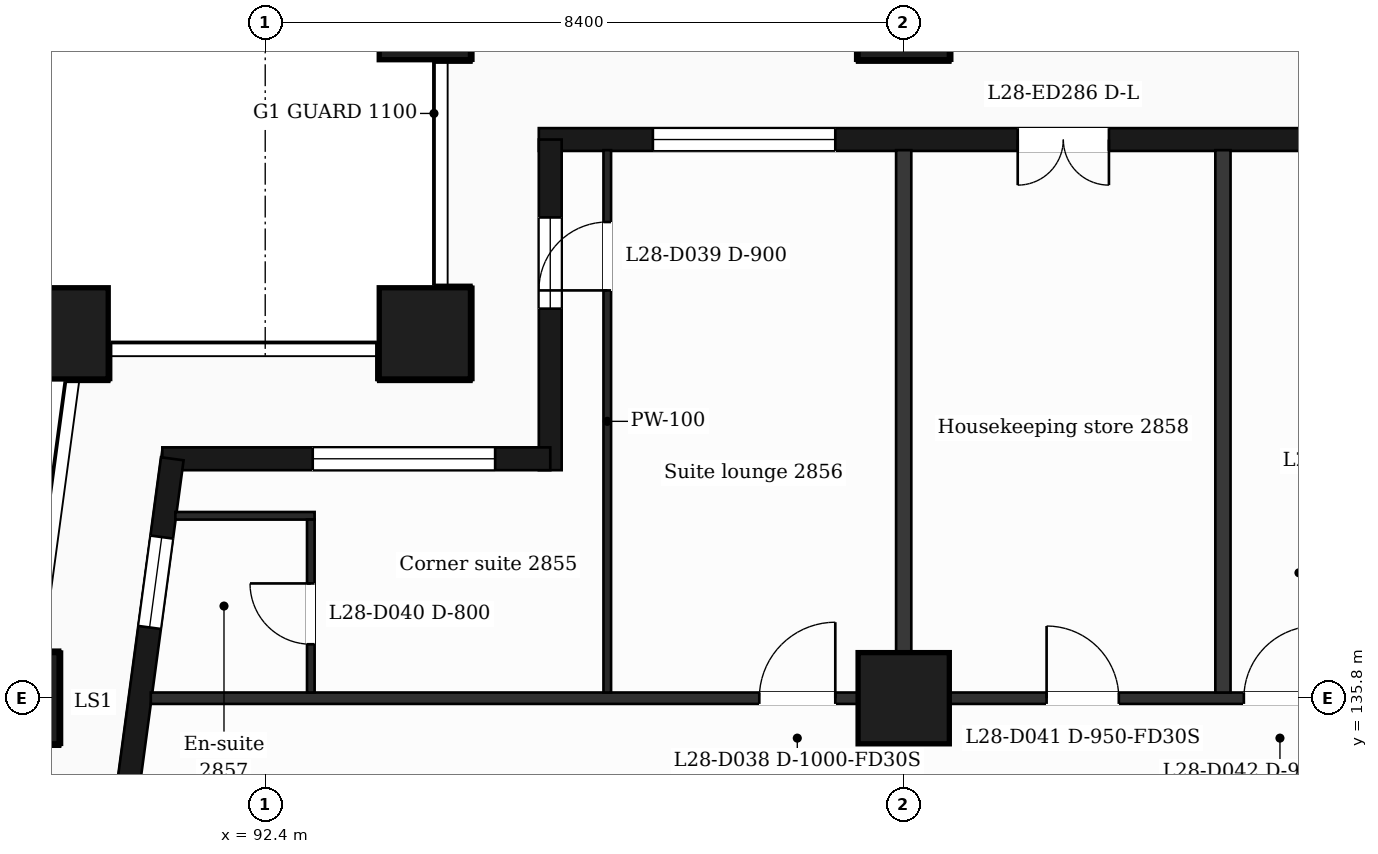
"""IFC4 building model, lengths in metres.
Left out: names, types, materials, properties, quantities, classifications, styles, units other than length and angle.
Written with IfcOpenShell. Run it as: python <this file> out.ifc"""

import sys

from ifc_helpers import new_model, si_unit, direction, frame, frame_2d, origin, origin_2d, place, context, subcontext, project, spatial, rectangle, extrude, element, fill, save


model = new_model("IFC4")
c1 = context("Model", 3, precision=1e-05, world=origin(), true_north=direction((0.0, 1.0)))
c2 = subcontext(c1, "Body", "Model", "MODEL_VIEW")
j1 = project(units=[si_unit("LENGTHUNIT", "METRE"), si_unit("PLANEANGLEUNIT", "RADIAN")], contexts=[c1])
p1 = place(None, origin())
s1 = spatial("IfcSite", under=j1, at=p1, CompositionType="ELEMENT")
p2 = place(p1, origin())
s2 = spatial("IfcBuilding", under=s1, at=p2, CompositionType="ELEMENT")
p3 = place(p2, frame((0.0, 0.0, 120.6)))
s3 = spatial("IfcBuildingStorey", under=s2, at=p3, CompositionType="ELEMENT", Elevation=120.6)
for number, where, z_axis, x_axis in (
    (1, (94.5, 140.6, 0.0), (0.0, 0.0, 1.0), (1.0, 0.0, 0.0)),
    (2, (89.735, 140.6, 0.0), (0.0, 0.0, 1.0), (1.0, 0.0, 0.0)),
    (3, (100.8, 135.8, 0.0), (0.0, 0.0, 1.0), (1.0, 0.0, 0.0)),
    (4, (89.088, 135.8, 0.0), (0.0, 0.0, 1.0), (1.0, 0.0, 0.0)),
    (5, (100.8, 144.8, 0.0), (0.0, 0.0, 1.0), (1.0, 0.0, 0.0)),
    (6, (94.5, 144.8, 0.0), (0.0, 0.0, 1.0), (1.0, 0.0, 0.0)),
):
    element("IfcColumn", number, at=place(p3, frame(where, z_axis=z_axis, x_axis=x_axis)), inside=s3, PredefinedType="COLUMN", context=c2, shape_type="SweptSolid", body=[
        extrude(rectangle(XDim=1.2, YDim=1.2, at=origin_2d()), origin(), (0.0, 0.0, 1.0), 3.7),
    ])
p4 = place(p3, frame((110.4, 143.15, 0.0), z_axis=(0.0, 0.0, 1.0), x_axis=(-1.0, 0.0, 0.0)))
e7 = element("IfcWall", 7, at=p4, inside=s3, PredefinedType="SOLIDWALL", context=c2, shape_type="SweptSolid", body=[
    extrude(rectangle(XDim=14.4, YDim=0.3, at=frame_2d((7.2, 0.0))), origin(), (0.0, 0.0, 1.0), 3.38),
])
p5 = place(p4, frame((2.7, 0.0, 0.9)))
e8 = element("IfcOpeningElement", 8, at=p5, cuts=e7, PredefinedType="OPENING", context=c2, shape_type="SweptSolid", body=[
    extrude(rectangle(XDim=1.2, YDim=2.1, at=frame_2d((0.6, 1.05))), frame((0.0, 0.16, 0.0), z_axis=(0.0, -1.0, 0.0), x_axis=(1.0, 0.0, 0.0)), (0.0, 0.0, 1.0), 0.32),
])
p6 = place(p4, frame((6.9, 0.0, 0.0)))
e9 = element("IfcOpeningElement", 9, at=p6, cuts=e7, PredefinedType="OPENING", context=c2, shape_type="SweptSolid", body=[
    extrude(rectangle(XDim=1.2, YDim=2.4, at=frame_2d((0.6, 1.2))), frame((0.0, 0.16, 0.0), z_axis=(0.0, -1.0, 0.0), x_axis=(1.0, 0.0, 0.0)), (0.0, 0.0, 1.0), 0.32),
])
p7 = place(p4, frame((10.5, 0.0, 0.9)))
e10 = element("IfcOpeningElement", 10, at=p7, cuts=e7, PredefinedType="OPENING", context=c2, shape_type="SweptSolid", body=[
    extrude(rectangle(XDim=2.4, YDim=2.1, at=frame_2d((1.2, 1.05))), frame((0.0, 0.16, 0.0), z_axis=(0.0, -1.0, 0.0), x_axis=(1.0, 0.0, 0.0)), (0.0, 0.0, 1.0), 0.32),
])
p8 = place(p3, frame((96.15, 143.15, 0.0), z_axis=(0.0, 0.0, 1.0), x_axis=(0.0, -1.0, 0.0)))
e11 = element("IfcWall", 11, at=p8, inside=s3, PredefinedType="SOLIDWALL", context=c2, shape_type="SweptSolid", body=[
    extrude(rectangle(XDim=4.35, YDim=0.3, at=frame_2d((2.175, 0.0))), origin(), (0.0, 0.0, 1.0), 3.38),
])
p9 = place(p8, frame((1.025, 0.0, 0.9)))
e12 = element("IfcOpeningElement", 12, at=p9, cuts=e11, PredefinedType="OPENING", context=c2, shape_type="SweptSolid", body=[
    extrude(rectangle(XDim=1.2, YDim=2.1, at=frame_2d((0.6, 1.05))), frame((0.0, 0.16, 0.0), z_axis=(0.0, -1.0, 0.0), x_axis=(1.0, 0.0, 0.0)), (0.0, 0.0, 1.0), 0.32),
])
p10 = place(p3, frame((96.15, 138.95, 0.0), z_axis=(0.0, 0.0, 1.0), x_axis=(-1.0, 0.0, 0.0)))
e13 = element("IfcWall", 13, at=p10, inside=s3, PredefinedType="SOLIDWALL", context=c2, shape_type="SweptSolid", body=[
    extrude(rectangle(XDim=5.104, YDim=0.3, at=frame_2d((2.552, 0.0))), origin(), (0.0, 0.0, 1.0), 3.38),
])
p11 = place(p10, frame((0.725, 0.0, 0.9)))
e14 = element("IfcOpeningElement", 14, at=p11, cuts=e13, PredefinedType="OPENING", context=c2, shape_type="SweptSolid", body=[
    extrude(rectangle(XDim=2.4, YDim=2.1, at=frame_2d((1.2, 1.05))), frame((0.0, 0.16, 0.0), z_axis=(0.0, -1.0, 0.0), x_axis=(1.0, 0.0, 0.0)), (0.0, 0.0, 1.0), 0.32),
])
p12 = place(p3, frame((91.177, 138.95, 0.0), z_axis=(0.0, 0.0, 1.0), x_axis=(-0.133426664613, -0.991058689065, 0.0)))
e15 = element("IfcWall", 15, at=p12, inside=s3, PredefinedType="SOLIDWALL", context=c2, shape_type="SweptSolid", body=[
    extrude(rectangle(XDim=6.609, YDim=0.3, at=frame_2d((3.305, 0.0))), origin(), (0.0, 0.0, 1.0), 3.38),
])
p13 = place(p12, frame((1.039, 0.0, 0.9)))
e16 = element("IfcOpeningElement", 16, at=p13, cuts=e15, PredefinedType="OPENING", context=c2, shape_type="SweptSolid", body=[
    extrude(rectangle(XDim=1.2, YDim=2.1, at=frame_2d((0.6, 1.05))), frame((0.0, 0.16, 0.0), z_axis=(0.0, -1.0, 0.0), x_axis=(1.0, 0.0, 0.0)), (0.0, 0.0, 1.0), 0.32),
])
p14 = place(p12, frame((4.294, 0.0, 0.0)))
e17 = element("IfcOpeningElement", 17, at=p14, cuts=e15, PredefinedType="OPENING", context=c2, shape_type="SweptSolid", body=[
    extrude(rectangle(XDim=1.2, YDim=2.4, at=frame_2d((0.6, 1.2))), frame((0.0, 0.16, 0.0), z_axis=(0.0, -1.0, 0.0), x_axis=(1.0, 0.0, 0.0)), (0.0, 0.0, 1.0), 0.32),
])
p15 = place(p3, frame((90.895, 135.8, 0.0), z_axis=(0.0, 0.0, 1.0), x_axis=(1.0, 0.0, 0.0)))
e18 = element("IfcWall", 18, at=p15, inside=s3, PredefinedType="PARTITIONING", context=c2, shape_type="SweptSolid", body=[
    extrude(rectangle(XDim=45.011, YDim=0.15, at=frame_2d((22.505, 0.0))), origin(), (0.0, 0.0, 1.0), 3.38),
])
p16 = place(p15, frame((8.005, 0.0, 0.0)))
e19 = element("IfcOpeningElement", 19, at=p16, cuts=e18, PredefinedType="OPENING", context=c2, shape_type="SweptSolid", body=[
    extrude(rectangle(XDim=1.0, YDim=2.1, at=frame_2d((0.5, 1.05))), frame((0.0, 0.085, 0.0), z_axis=(0.0, -1.0, 0.0), x_axis=(1.0, 0.0, 0.0)), (0.0, 0.0, 1.0), 0.17),
])
p17 = place(p15, frame((11.785, 0.0, 0.0)))
e20 = element("IfcOpeningElement", 20, at=p17, cuts=e18, PredefinedType="OPENING", context=c2, shape_type="SweptSolid", body=[
    extrude(rectangle(XDim=0.95, YDim=2.1, at=frame_2d((0.475, 1.05))), frame((0.0, 0.085, 0.0), z_axis=(0.0, -1.0, 0.0), x_axis=(1.0, 0.0, 0.0)), (0.0, 0.0, 1.0), 0.17),
])
p18 = place(p15, frame((14.38, 0.0, 0.0)))
e21 = element("IfcOpeningElement", 21, at=p18, cuts=e18, PredefinedType="OPENING", context=c2, shape_type="SweptSolid", body=[
    extrude(rectangle(XDim=0.95, YDim=2.1, at=frame_2d((0.475, 1.05))), frame((0.0, 0.085, 0.0), z_axis=(0.0, -1.0, 0.0), x_axis=(1.0, 0.0, 0.0)), (0.0, 0.0, 1.0), 0.17),
])
p19 = place(p15, frame((19.075, 0.0, 0.0)))
e22 = element("IfcOpeningElement", 22, at=p19, cuts=e18, PredefinedType="OPENING", context=c2, shape_type="SweptSolid", body=[
    extrude(rectangle(XDim=0.95, YDim=2.1, at=frame_2d((0.475, 1.05))), frame((0.0, 0.085, 0.0), z_axis=(0.0, -1.0, 0.0), x_axis=(1.0, 0.0, 0.0)), (0.0, 0.0, 1.0), 0.17),
])
p20 = place(p15, frame((24.855, 0.0, 0.0)))
e23 = element("IfcOpeningElement", 23, at=p20, cuts=e18, PredefinedType="OPENING", context=c2, shape_type="SweptSolid", body=[
    extrude(rectangle(XDim=1.0, YDim=2.1, at=frame_2d((0.5, 1.05))), frame((0.0, 0.085, 0.0), z_axis=(0.0, -1.0, 0.0), x_axis=(1.0, 0.0, 0.0)), (0.0, 0.0, 1.0), 0.17),
])
p21 = place(p15, frame((27.515, 0.0, 0.0)))
e24 = element("IfcOpeningElement", 24, at=p21, cuts=e18, PredefinedType="OPENING", context=c2, shape_type="SweptSolid", body=[
    extrude(rectangle(XDim=0.95, YDim=2.1, at=frame_2d((0.475, 1.05))), frame((0.0, 0.085, 0.0), z_axis=(0.0, -1.0, 0.0), x_axis=(1.0, 0.0, 0.0)), (0.0, 0.0, 1.0), 0.17),
])
p22 = place(p15, frame((33.242, 0.0, 0.0)))
e25 = element("IfcOpeningElement", 25, at=p22, cuts=e18, PredefinedType="OPENING", context=c2, shape_type="SweptSolid", body=[
    extrude(rectangle(XDim=0.95, YDim=2.1, at=frame_2d((0.475, 1.05))), frame((0.0, 0.085, 0.0), z_axis=(0.0, -1.0, 0.0), x_axis=(1.0, 0.0, 0.0)), (0.0, 0.0, 1.0), 0.17),
])
p23 = place(p15, frame((39.814, 0.0, 0.0)))
e26 = element("IfcOpeningElement", 26, at=p23, cuts=e18, PredefinedType="OPENING", context=c2, shape_type="SweptSolid", body=[
    extrude(rectangle(XDim=0.95, YDim=2.1, at=frame_2d((0.475, 1.05))), frame((0.0, 0.085, 0.0), z_axis=(0.0, -1.0, 0.0), x_axis=(1.0, 0.0, 0.0)), (0.0, 0.0, 1.0), 0.17),
])
p24 = place(p3, frame((91.218, 138.2, 0.0), z_axis=(0.0, 0.0, 1.0), x_axis=(1.0, 0.0, 0.0)))
e27 = element("IfcWall", 27, at=p24, inside=s3, PredefinedType="PARTITIONING", context=c2, shape_type="SweptSolid", body=[
    extrude(rectangle(XDim=1.832, YDim=0.1, at=frame_2d((0.916, 0.0))), origin(), (0.0, 0.0, 1.0), 3.38),
])
p25 = place(p3, frame((93.0, 135.875, 0.0), z_axis=(0.0, 0.0, 1.0), x_axis=(0.0, 1.0, 0.0)))
e28 = element("IfcWall", 28, at=p25, inside=s3, PredefinedType="PARTITIONING", context=c2, shape_type="SweptSolid", body=[
    extrude(rectangle(XDim=2.275, YDim=0.1, at=frame_2d((1.137, 0.0))), origin(), (0.0, 0.0, 1.0), 3.38),
])
p26 = place(p25, frame((0.635, 0.0, 0.0)))
e29 = element("IfcOpeningElement", 29, at=p26, cuts=e28, PredefinedType="OPENING", context=c2, shape_type="SweptSolid", body=[
    extrude(rectangle(XDim=0.8, YDim=2.1, at=frame_2d((0.4, 1.05))), frame((0.0, 0.06, 0.0), z_axis=(0.0, -1.0, 0.0), x_axis=(1.0, 0.0, 0.0)), (0.0, 0.0, 1.0), 0.12),
])
p27 = place(p3, frame((96.9, 135.875, 0.0), z_axis=(0.0, 0.0, 1.0), x_axis=(0.0, 1.0, 0.0)))
e30 = element("IfcWall", 30, at=p27, inside=s3, PredefinedType="PARTITIONING", context=c2, shape_type="SweptSolid", body=[
    extrude(rectangle(XDim=7.135, YDim=0.1, at=frame_2d((3.567, 0.0))), origin(), (0.0, 0.0, 1.0), 3.38),
])
p28 = place(p27, frame((5.29, 0.0, 0.0)))
e31 = element("IfcOpeningElement", 31, at=p28, cuts=e30, PredefinedType="OPENING", context=c2, shape_type="SweptSolid", body=[
    extrude(rectangle(XDim=0.9, YDim=2.1, at=frame_2d((0.45, 1.05))), frame((0.0, 0.06, 0.0), z_axis=(0.0, -1.0, 0.0), x_axis=(1.0, 0.0, 0.0)), (0.0, 0.0, 1.0), 0.12),
])
for number, where, z_axis, x_axis in (
    (32, (100.8, 135.875, 0.0), (0.0, 0.0, 1.0), (0.0, 1.0, 0.0)),
    (33, (105.0, 135.875, 0.0), (0.0, 0.0, 1.0), (0.0, 1.0, 0.0)),
):
    element("IfcWall", number, at=place(p3, frame(where, z_axis=z_axis, x_axis=x_axis)), inside=s3, PredefinedType="PARTITIONING", context=c2, shape_type="SweptSolid", body=[
        extrude(rectangle(XDim=7.135, YDim=0.2, at=frame_2d((3.567, 0.0))), origin(), (0.0, 0.0, 1.0), 3.38),
    ])
p29 = place(p6, origin())
e34 = element("IfcDoor", 34, at=p29, inside=s3, OperationType="DOUBLE_DOOR_SINGLE_SWING", PredefinedType="DOOR", context=c2, shape_type="SweptSolid", body=[
    extrude(rectangle(XDim=1.2, YDim=2.4, at=frame_2d((0.6, 1.2))), frame((0.0, 0.025, 0.0), z_axis=(0.0, -1.0, 0.0), x_axis=(1.0, 0.0, 0.0)), (0.0, 0.0, 1.0), 0.05),
])
fill(e9, e34)
p30 = place(p7, origin())
e35 = element("IfcWindow", 35, at=p30, inside=s3, PartitioningType="SINGLE_PANEL", PredefinedType="WINDOW", context=c2, shape_type="SweptSolid", body=[
    extrude(rectangle(XDim=2.4, YDim=2.1, at=frame_2d((1.2, 1.05))), frame((0.0, 0.03, 0.0), z_axis=(0.0, -1.0, 0.0), x_axis=(1.0, 0.0, 0.0)), (0.0, 0.0, 1.0), 0.06),
])
fill(e10, e35)
p31 = place(p9, origin())
e36 = element("IfcWindow", 36, at=p31, inside=s3, PartitioningType="SINGLE_PANEL", PredefinedType="WINDOW", context=c2, shape_type="SweptSolid", body=[
    extrude(rectangle(XDim=1.2, YDim=2.1, at=frame_2d((0.6, 1.05))), frame((0.0, 0.03, 0.0), z_axis=(0.0, -1.0, 0.0), x_axis=(1.0, 0.0, 0.0)), (0.0, 0.0, 1.0), 0.06),
])
fill(e12, e36)
p32 = place(p11, origin())
e37 = element("IfcWindow", 37, at=p32, inside=s3, PartitioningType="SINGLE_PANEL", PredefinedType="WINDOW", context=c2, shape_type="SweptSolid", body=[
    extrude(rectangle(XDim=2.4, YDim=2.1, at=frame_2d((1.2, 1.05))), frame((0.0, 0.03, 0.0), z_axis=(0.0, -1.0, 0.0), x_axis=(1.0, 0.0, 0.0)), (0.0, 0.0, 1.0), 0.06),
])
fill(e14, e37)
p33 = place(p13, origin())
e38 = element("IfcWindow", 38, at=p33, inside=s3, PartitioningType="SINGLE_PANEL", PredefinedType="WINDOW", context=c2, shape_type="SweptSolid", body=[
    extrude(rectangle(XDim=1.2, YDim=2.1, at=frame_2d((0.6, 1.05))), frame((0.0, 0.03, 0.0), z_axis=(0.0, -1.0, 0.0), x_axis=(1.0, 0.0, 0.0)), (0.0, 0.0, 1.0), 0.06),
])
fill(e16, e38)
p34 = place(p16, origin())
e39 = element("IfcDoor", 39, at=p34, inside=s3, OperationType="SINGLE_SWING_RIGHT", PredefinedType="DOOR", context=c2, shape_type="SweptSolid", body=[
    extrude(rectangle(XDim=1.0, YDim=2.1, at=frame_2d((0.5, 1.05))), frame((0.0, 0.025, 0.0), z_axis=(0.0, -1.0, 0.0), x_axis=(1.0, 0.0, 0.0)), (0.0, 0.0, 1.0), 0.05),
])
fill(e19, e39)
p35 = place(p28, origin())
e40 = element("IfcDoor", 40, at=p35, inside=s3, OperationType="SINGLE_SWING_LEFT", PredefinedType="DOOR", context=c2, shape_type="SweptSolid", body=[
    extrude(rectangle(XDim=0.9, YDim=2.1, at=frame_2d((0.45, 1.05))), frame((0.0, 0.025, 0.0), z_axis=(0.0, -1.0, 0.0), x_axis=(1.0, 0.0, 0.0)), (0.0, 0.0, 1.0), 0.05),
])
fill(e31, e40)
p36 = place(p26, origin())
e41 = element("IfcDoor", 41, at=p36, inside=s3, OperationType="SINGLE_SWING_RIGHT", PredefinedType="DOOR", context=c2, shape_type="SweptSolid", body=[
    extrude(rectangle(XDim=0.8, YDim=2.1, at=frame_2d((0.4, 1.05))), frame((0.0, 0.025, 0.0), z_axis=(0.0, -1.0, 0.0), x_axis=(1.0, 0.0, 0.0)), (0.0, 0.0, 1.0), 0.05),
])
fill(e29, e41)
p37 = place(p17, origin())
e42 = element("IfcDoor", 42, at=p37, inside=s3, OperationType="SINGLE_SWING_LEFT", PredefinedType="DOOR", context=c2, shape_type="SweptSolid", body=[
    extrude(rectangle(XDim=0.95, YDim=2.1, at=frame_2d((0.475, 1.05))), frame((0.0, 0.025, 0.0), z_axis=(0.0, -1.0, 0.0), x_axis=(1.0, 0.0, 0.0)), (0.0, 0.0, 1.0), 0.05),
])
fill(e20, e42)
p38 = place(p18, origin())
e43 = element("IfcDoor", 43, at=p38, inside=s3, OperationType="SINGLE_SWING_RIGHT", PredefinedType="DOOR", context=c2, shape_type="SweptSolid", body=[
    extrude(rectangle(XDim=0.95, YDim=2.1, at=frame_2d((0.475, 1.05))), frame((0.0, 0.025, 0.0), z_axis=(0.0, -1.0, 0.0), x_axis=(1.0, 0.0, 0.0)), (0.0, 0.0, 1.0), 0.05),
])
fill(e21, e43)
save(model, sys.argv[1])
